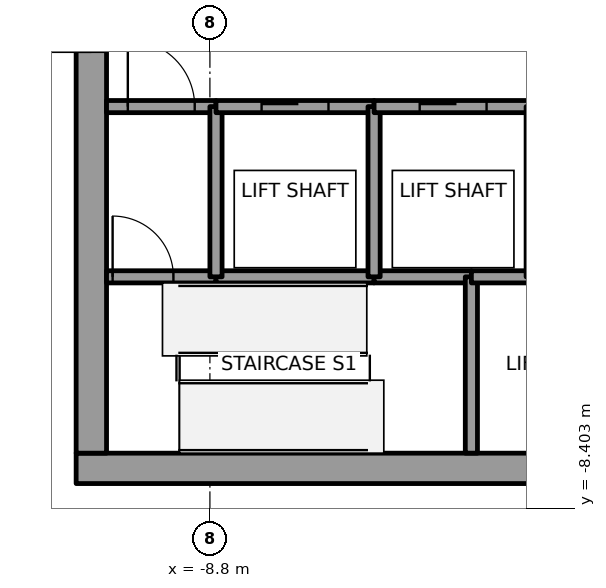
"""IFC4 building model, lengths in metres.
Left out: names, types, materials, properties, quantities, classifications, styles, units other than length and angle.
Written with IfcOpenShell. Run it as: python <this file> out.ifc"""

import sys

from ifc_helpers import new_model, si_unit, direction, frame, frame_2d, origin, place, context, subcontext, project, spatial, rectangle, extrude, element, fill, save


model = new_model("IFC4")
c1 = context("Model", 3, precision=1e-05, world=origin(), true_north=direction((0.0, 1.0)))
c2 = subcontext(c1, "Body", "Model", "MODEL_VIEW")
j1 = project(units=[si_unit("LENGTHUNIT", "METRE"), si_unit("PLANEANGLEUNIT", "RADIAN")], contexts=[c1])
p1 = place(None, origin())
s1 = spatial("IfcSite", under=j1, at=p1, CompositionType="ELEMENT")
p2 = place(p1, origin())
s2 = spatial("IfcBuilding", under=s1, at=p2, CompositionType="ELEMENT")
p3 = place(p2, frame((0.0, 0.0, 307.0)))
s3 = spatial("IfcBuildingStorey", under=s2, at=p3, CompositionType="ELEMENT", Elevation=307.0)
p4 = place(p3, frame((-11.0, -7.75, 0.0), z_axis=(0.0, 0.0, 1.0), x_axis=(1.0, 0.0, 0.0)))
e1 = element("IfcWall", 1, at=p4, inside=s3, PredefinedType="SHEAR", context=c2, shape_type="SweptSolid", body=[
    extrude(rectangle(XDim=22.0, YDim=0.5, at=frame_2d((11.0, 0.0))), origin(), (0.0, 0.0, 1.0), 4.0),
])
p5 = place(p4, frame((10.45, 0.0, 0.0)))
e2 = element("IfcOpeningElement", 2, at=p5, cuts=e1, PredefinedType="OPENING", context=c2, shape_type="SweptSolid", body=[
    extrude(rectangle(XDim=1.1, YDim=2.1, at=frame_2d((0.55, 1.05))), frame((0.0, 0.25, 0.0), z_axis=(0.0, -1.0, 0.0), x_axis=(1.0, 0.0, 0.0)), (0.0, 0.0, 1.0), 0.5),
])
p6 = place(p3, frame((-10.75, -7.5, 0.0), z_axis=(0.0, 0.0, 1.0), x_axis=(0.0, 1.0, 0.0)))
e3 = element("IfcWall", 3, at=p6, inside=s3, PredefinedType="SHEAR", context=c2, shape_type="SweptSolid", body=[
    extrude(rectangle(XDim=15.0, YDim=0.5, at=frame_2d((7.5, 0.0))), origin(), (0.0, 0.0, 1.0), 4.0),
])
p7 = place(p6, frame((6.6, 0.0, 0.0)))
e4 = element("IfcOpeningElement", 4, at=p7, cuts=e3, PredefinedType="OPENING", context=c2, shape_type="SweptSolid", body=[
    extrude(rectangle(XDim=1.8, YDim=2.1, at=frame_2d((0.9, 1.05))), frame((0.0, 0.25, 0.0), z_axis=(0.0, -1.0, 0.0), x_axis=(1.0, 0.0, 0.0)), (0.0, 0.0, 1.0), 0.5),
])
p8 = place(p3, frame((-10.5, -4.6, 0.0), z_axis=(0.0, 0.0, 1.0), x_axis=(1.0, 0.0, 0.0)))
e5 = element("IfcWall", 5, at=p8, inside=s3, PredefinedType="SOLIDWALL", context=c2, shape_type="SweptSolid", body=[
    extrude(rectangle(XDim=1.8, YDim=0.2, at=frame_2d((0.9, 0.0))), origin(), (0.0, 0.0, 1.0), 3.85),
])
p9 = place(p8, frame((0.1, 0.0, 0.0)))
e6 = element("IfcOpeningElement", 6, at=p9, cuts=e5, PredefinedType="OPENING", context=c2, shape_type="SweptSolid", body=[
    extrude(rectangle(XDim=1.0, YDim=2.1, at=frame_2d((0.5, 1.05))), frame((0.0, 0.1, 0.0), z_axis=(0.0, -1.0, 0.0), x_axis=(1.0, 0.0, 0.0)), (0.0, 0.0, 1.0), 0.2),
])
p10 = place(p3, frame((-10.5, -1.8, 0.0), z_axis=(0.0, 0.0, 1.0), x_axis=(1.0, 0.0, 0.0)))
e7 = element("IfcWall", 7, at=p10, inside=s3, PredefinedType="SOLIDWALL", context=c2, shape_type="SweptSolid", body=[
    extrude(rectangle(XDim=1.8, YDim=0.2, at=frame_2d((0.9, 0.0))), origin(), (0.0, 0.0, 1.0), 3.85),
])
p11 = place(p10, frame((0.35, 0.0, 0.0)))
e8 = element("IfcOpeningElement", 8, at=p11, cuts=e7, PredefinedType="OPENING", context=c2, shape_type="SweptSolid", body=[
    extrude(rectangle(XDim=1.1, YDim=2.1, at=frame_2d((0.55, 1.05))), frame((0.0, 0.1, 0.0), z_axis=(0.0, -1.0, 0.0), x_axis=(1.0, 0.0, 0.0)), (0.0, 0.0, 1.0), 0.2),
])
p12 = place(p3, frame((-8.7, -4.6, 0.0), z_axis=(0.0, 0.0, 1.0), x_axis=(1.0, 0.0, 0.0)))
e9 = element("IfcWall", 9, at=p12, inside=s3, PredefinedType="SOLIDWALL", context=c2, shape_type="SweptSolid", body=[
    extrude(rectangle(XDim=2.6, YDim=0.2, at=frame_2d((1.3, 0.0))), origin(), (0.0, 0.0, 1.0), 3.85),
])
p13 = place(p3, frame((-8.7, -4.6, 0.0), z_axis=(0.0, 0.0, 1.0), x_axis=(0.0, 1.0, 0.0)))
e10 = element("IfcWall", 10, at=p13, inside=s3, PredefinedType="SOLIDWALL", context=c2, shape_type="SweptSolid", body=[
    extrude(rectangle(XDim=2.8, YDim=0.2, at=frame_2d((1.4, 0.0))), origin(), (0.0, 0.0, 1.0), 3.85),
])
p14 = place(p3, frame((-8.7, -1.8, 0.0), z_axis=(0.0, 0.0, 1.0), x_axis=(1.0, 0.0, 0.0)))
e11 = element("IfcWall", 11, at=p14, inside=s3, PredefinedType="SOLIDWALL", context=c2, shape_type="SweptSolid", body=[
    extrude(rectangle(XDim=2.6, YDim=0.2, at=frame_2d((1.3, 0.0))), origin(), (0.0, 0.0, 1.0), 3.85),
])
p15 = place(p14, frame((0.75, 0.0, 0.0)))
e12 = element("IfcOpeningElement", 12, at=p15, cuts=e11, PredefinedType="OPENING", context=c2, shape_type="SweptSolid", body=[
    extrude(rectangle(XDim=1.1, YDim=2.1, at=frame_2d((0.55, 1.05))), frame((0.0, 0.1, 0.0), z_axis=(0.0, -1.0, 0.0), x_axis=(1.0, 0.0, 0.0)), (0.0, 0.0, 1.0), 0.2),
])
p16 = place(p3, frame((-6.1, -4.6, 0.0), z_axis=(0.0, 0.0, 1.0), x_axis=(1.0, 0.0, 0.0)))
e13 = element("IfcWall", 13, at=p16, inside=s3, PredefinedType="SOLIDWALL", context=c2, shape_type="SweptSolid", body=[
    extrude(rectangle(XDim=1.6, YDim=0.2, at=frame_2d((0.8, 0.0))), origin(), (0.0, 0.0, 1.0), 3.85),
])
p17 = place(p3, frame((-6.1, -4.6, 0.0), z_axis=(0.0, 0.0, 1.0), x_axis=(0.0, 1.0, 0.0)))
e14 = element("IfcWall", 14, at=p17, inside=s3, PredefinedType="SOLIDWALL", context=c2, shape_type="SweptSolid", body=[
    extrude(rectangle(XDim=2.8, YDim=0.2, at=frame_2d((1.4, 0.0))), origin(), (0.0, 0.0, 1.0), 3.85),
])
p18 = place(p3, frame((-6.1, -1.8, 0.0), z_axis=(0.0, 0.0, 1.0), x_axis=(1.0, 0.0, 0.0)))
e15 = element("IfcWall", 15, at=p18, inside=s3, PredefinedType="SOLIDWALL", context=c2, shape_type="SweptSolid", body=[
    extrude(rectangle(XDim=2.6, YDim=0.2, at=frame_2d((1.3, 0.0))), origin(), (0.0, 0.0, 1.0), 3.85),
])
p19 = place(p18, frame((0.75, 0.0, 0.0)))
e16 = element("IfcOpeningElement", 16, at=p19, cuts=e15, PredefinedType="OPENING", context=c2, shape_type="SweptSolid", body=[
    extrude(rectangle(XDim=1.1, YDim=2.1, at=frame_2d((0.55, 1.05))), frame((0.0, 0.1, 0.0), z_axis=(0.0, -1.0, 0.0), x_axis=(1.0, 0.0, 0.0)), (0.0, 0.0, 1.0), 0.2),
])
p20 = place(p3, frame((-4.5, -4.6, 0.0), z_axis=(0.0, 0.0, 1.0), x_axis=(0.0, -1.0, 0.0)))
e17 = element("IfcWall", 17, at=p20, inside=s3, PredefinedType="SOLIDWALL", context=c2, shape_type="SweptSolid", body=[
    extrude(rectangle(XDim=2.9, YDim=0.2, at=frame_2d((1.45, 0.0))), origin(), (0.0, 0.0, 1.0), 3.85),
])
p21 = place(p3, frame((-4.5, -4.6, 0.0), z_axis=(0.0, 0.0, 1.0), x_axis=(1.0, 0.0, 0.0)))
e18 = element("IfcWall", 18, at=p21, inside=s3, PredefinedType="SOLIDWALL", context=c2, shape_type="SweptSolid", body=[
    extrude(rectangle(XDim=1.0, YDim=0.2, at=frame_2d((0.5, 0.0))), origin(), (0.0, 0.0, 1.0), 3.85),
])
p22 = place(p15, origin())
e19 = element("IfcDoor", 19, at=p22, inside=s3, OperationType="SLIDING_TO_RIGHT", PredefinedType="DOOR", context=c2, shape_type="SweptSolid", body=[
    extrude(rectangle(XDim=1.1, YDim=2.1, at=frame_2d((0.55, 1.05))), frame((0.0, 0.025, 0.0), z_axis=(0.0, -1.0, 0.0), x_axis=(1.0, 0.0, 0.0)), (0.0, 0.0, 1.0), 0.05),
])
fill(e12, e19)
p23 = place(p19, origin())
e20 = element("IfcDoor", 20, at=p23, inside=s3, OperationType="SLIDING_TO_LEFT", PredefinedType="DOOR", context=c2, shape_type="SweptSolid", body=[
    extrude(rectangle(XDim=1.1, YDim=2.1, at=frame_2d((0.55, 1.05))), frame((0.0, 0.025, 0.0), z_axis=(0.0, -1.0, 0.0), x_axis=(1.0, 0.0, 0.0)), (0.0, 0.0, 1.0), 0.05),
])
fill(e16, e20)
p24 = place(p11, origin())
e21 = element("IfcDoor", 21, at=p24, inside=s3, OperationType="SINGLE_SWING_RIGHT", PredefinedType="DOOR", context=c2, shape_type="SweptSolid", body=[
    extrude(rectangle(XDim=1.1, YDim=2.1, at=frame_2d((0.55, 1.05))), frame((0.0, 0.025, 0.0), z_axis=(0.0, -1.0, 0.0), x_axis=(1.0, 0.0, 0.0)), (0.0, 0.0, 1.0), 0.05),
])
fill(e8, e21)
p25 = place(p9, origin())
e22 = element("IfcDoor", 22, at=p25, inside=s3, OperationType="SINGLE_SWING_LEFT", PredefinedType="DOOR", context=c2, shape_type="SweptSolid", body=[
    extrude(rectangle(XDim=1.0, YDim=2.1, at=frame_2d((0.5, 1.05))), frame((0.0, 0.025, 0.0), z_axis=(0.0, -1.0, 0.0), x_axis=(1.0, 0.0, 0.0)), (0.0, 0.0, 1.0), 0.05),
])
fill(e6, e22)
p26 = place(p7, origin())
e23 = element("IfcDoor", 23, at=p26, inside=s3, OperationType="DOUBLE_DOOR_SINGLE_SWING", PredefinedType="DOOR", context=c2, shape_type="SweptSolid", body=[
    extrude(rectangle(XDim=1.8, YDim=2.1, at=frame_2d((0.9, 1.05))), frame((0.0, 0.025, 0.0), z_axis=(0.0, -1.0, 0.0), x_axis=(1.0, 0.0, 0.0)), (0.0, 0.0, 1.0), 0.05),
])
fill(e4, e23)
save(model, sys.argv[1])
